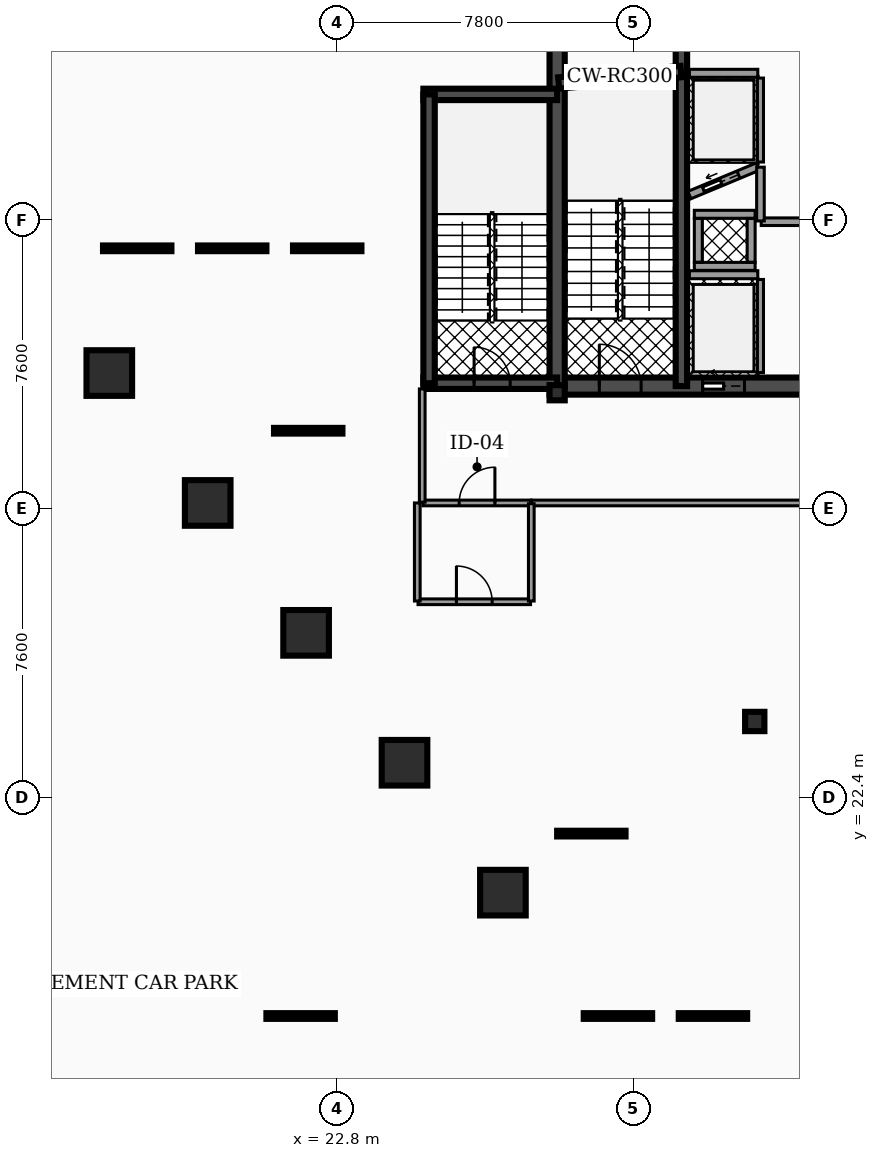
"""IFC4 building model, lengths in metres.
Left out: names, types, materials, properties, quantities, classifications, styles, units other than length and angle.
Written with IfcOpenShell. Run it as: python <this file> out.ifc"""

import sys

from ifc_helpers import new_model, si_unit, direction, frame, frame_2d, origin, origin_2d, place, context, subcontext, project, spatial, rectangle, hollow_rectangle, hollow_circle, extrude, element, fill, save


model = new_model("IFC4")
c1 = context("Model", 3, precision=1e-05, world=origin(), true_north=direction((0.0, 1.0)))
c2 = subcontext(c1, "Body", "Model", "MODEL_VIEW")
j1 = project(units=[si_unit("LENGTHUNIT", "METRE"), si_unit("PLANEANGLEUNIT", "RADIAN")], contexts=[c1])
p1 = place(None, origin())
s1 = spatial("IfcSite", under=j1, at=p1, CompositionType="ELEMENT")
p2 = place(p1, origin())
s2 = spatial("IfcBuilding", under=s1, at=p2, CompositionType="ELEMENT")
p3 = place(p2, frame((0.0, 0.0, -4.08)))
s3 = spatial("IfcBuildingStorey", under=s2, at=p3, CompositionType="ELEMENT", Elevation=-4.08)
p4 = place(p3, frame((28.4, 33.225, 0.0), z_axis=(0.0, 0.0, 1.0), x_axis=(1.0, 0.0, 0.0)))
e1 = element("IfcWall", 1, at=p4, inside=s3, PredefinedType="SHEAR", context=c2, shape_type="SweptSolid", body=[
    extrude(rectangle(XDim=20.11, YDim=0.45, at=frame_2d((10.055, 0.0))), origin(), (0.0, 0.0, 1.0), 3.76),
])
p5 = place(p4, frame((4.03, 0.0, 0.0)))
e2 = element("IfcOpeningElement", 2, at=p5, cuts=e1, PredefinedType="OPENING", context=c2, shape_type="SweptSolid", body=[
    extrude(rectangle(XDim=1.1, YDim=2.15, at=frame_2d((0.55, 1.075))), frame((0.0, 0.235, 0.0), z_axis=(0.0, -1.0, 0.0), x_axis=(1.0, 0.0, 0.0)), (0.0, 0.0, 1.0), 0.47),
])
p6 = place(p4, frame((14.87, 0.0, 0.0)))
e3 = element("IfcOpeningElement", 3, at=p6, cuts=e1, PredefinedType="OPENING", context=c2, shape_type="SweptSolid", body=[
    extrude(rectangle(XDim=1.1, YDim=2.15, at=frame_2d((0.55, 1.075))), frame((0.0, 0.235, 0.0), z_axis=(0.0, -1.0, 0.0), x_axis=(1.0, 0.0, 0.0)), (0.0, 0.0, 1.0), 0.47),
])
p7 = place(p4, frame((1.31, 0.0, 0.0)))
e4 = element("IfcOpeningElement", 4, at=p7, cuts=e1, PredefinedType="OPENING", context=c2, shape_type="SweptSolid", body=[
    extrude(rectangle(XDim=1.1, YDim=2.2, at=frame_2d((0.55, 1.1))), frame((0.0, 0.235, 0.0), z_axis=(0.0, -1.0, 0.0), x_axis=(1.0, 0.0, 0.0)), (0.0, 0.0, 1.0), 0.47),
])
p8 = place(p4, frame((9.44, 0.0, 0.0)))
e5 = element("IfcOpeningElement", 5, at=p8, cuts=e1, PredefinedType="OPENING", context=c2, shape_type="SweptSolid", body=[
    extrude(rectangle(XDim=1.12, YDim=2.05, at=frame_2d((0.56, 1.025))), frame((0.0, 0.235, 0.0), z_axis=(0.0, -1.0, 0.0), x_axis=(1.0, 0.0, 0.0)), (0.0, 0.0, 1.0), 0.47),
])
p9 = place(p4, frame((17.65, 0.0, 0.0)))
e6 = element("IfcOpeningElement", 6, at=p9, cuts=e1, PredefinedType="OPENING", context=c2, shape_type="SweptSolid", body=[
    extrude(rectangle(XDim=1.1, YDim=2.2, at=frame_2d((0.55, 1.1))), frame((0.0, 0.235, 0.0), z_axis=(0.0, -1.0, 0.0), x_axis=(1.0, 0.0, 0.0)), (0.0, 0.0, 1.0), 0.47),
])
p10 = place(p3, frame((28.6, 33.225, 0.0), z_axis=(0.0, 0.0, 1.0), x_axis=(0.0, 1.0, 0.0)))
e7 = element("IfcWall", 7, at=p10, inside=s3, PredefinedType="SHEAR", context=c2, shape_type="SweptSolid", body=[
    extrude(rectangle(XDim=10.25, YDim=0.4, at=frame_2d((5.125, 0.0))), origin(), (0.0, 0.0, 1.0), 3.76),
])
p11 = place(p3, frame((31.87, 33.225, 0.0), z_axis=(0.0, 0.0, 1.0), x_axis=(0.0, 1.0, 0.0)))
e8 = element("IfcWall", 8, at=p11, inside=s3, PredefinedType="SHEAR", context=c2, shape_type="SweptSolid", body=[
    extrude(rectangle(XDim=10.25, YDim=0.3, at=frame_2d((5.125, 0.0))), origin(), (0.0, 0.0, 1.0), 3.76),
])
p12 = place(p3, frame((28.64, 41.2, 0.0), z_axis=(0.0, 0.0, 1.0), x_axis=(0.995687118776, 0.092774789157, 0.0)))
e9 = element("IfcWall", 9, at=p12, inside=s3, PredefinedType="SHEAR", context=c2, shape_type="SweptSolid", body=[
    extrude(rectangle(XDim=3.234, YDim=0.3, at=frame_2d((1.617, 0.0))), origin(), (0.0, 0.0, 1.0), 3.76),
])
p13 = place(p3, frame((25.08, 40.9, 0.0), z_axis=(0.0, 0.0, 1.0), x_axis=(1.0, 0.0, 0.0)))
e10 = element("IfcWall", 10, at=p13, inside=s3, PredefinedType="SHEAR", context=c2, shape_type="SweptSolid", body=[
    extrude(rectangle(XDim=3.52, YDim=0.3, at=frame_2d((1.76, 0.0))), origin(), (0.0, 0.0, 1.0), 3.76),
])
p14 = place(p3, frame((25.08, 33.3, 0.0), z_axis=(0.0, 0.0, 1.0), x_axis=(1.0, 0.0, 0.0)))
e11 = element("IfcWall", 11, at=p14, inside=s3, PredefinedType="SHEAR", context=c2, shape_type="SweptSolid", body=[
    extrude(rectangle(XDim=3.52, YDim=0.3, at=frame_2d((1.76, 0.0))), origin(), (0.0, 0.0, 1.0), 3.76),
])
p15 = place(p14, frame((1.335, 0.0, 0.0)))
e12 = element("IfcOpeningElement", 12, at=p15, cuts=e11, PredefinedType="OPENING", context=c2, shape_type="SweptSolid", body=[
    extrude(rectangle(XDim=0.95, YDim=2.2, at=frame_2d((0.475, 1.1))), frame((0.0, 0.16, 0.0), z_axis=(0.0, -1.0, 0.0), x_axis=(1.0, 0.0, 0.0)), (0.0, 0.0, 1.0), 0.32),
])
p16 = place(p3, frame((25.23, 33.3, 0.0), z_axis=(0.0, 0.0, 1.0), x_axis=(0.0, 1.0, 0.0)))
e13 = element("IfcWall", 13, at=p16, inside=s3, PredefinedType="SHEAR", context=c2, shape_type="SweptSolid", body=[
    extrude(rectangle(XDim=7.6, YDim=0.3, at=frame_2d((3.8, 0.0))), origin(), (0.0, 0.0, 1.0), 3.76),
])
for number, where, z_axis, x_axis in (
    (14, (16.815, 33.568, 0.0), (0.0, 0.0, 1.0), (1.0, 0.0, 0.0)),
    (15, (19.405, 30.15, 0.0), (0.0, 0.0, 1.0), (1.0, 0.0, 0.0)),
    (16, (21.994, 26.732, 0.0), (0.0, 0.0, 1.0), (1.0, 0.0, 0.0)),
    (17, (24.583, 23.314, 0.0), (0.0, 0.0, 1.0), (1.0, 0.0, 0.0)),
    (18, (27.173, 19.896, 0.0), (0.0, 0.0, 1.0), (1.0, 0.0, 0.0)),
):
    element("IfcColumn", number, at=place(p3, frame(where, z_axis=z_axis, x_axis=x_axis)), inside=s3, PredefinedType="COLUMN", context=c2, shape_type="SweptSolid", body=[
        extrude(hollow_rectangle(XDim=1.2, YDim=1.2, WallThickness=0.06, at=origin_2d()), origin(), (0.0, 0.0, 1.0), 3.76),
    ])
p17 = place(p3, frame((28.6, 33.05, 0.0), z_axis=(0.0, 0.0, 1.0), x_axis=(1.0, 0.0, 0.0)))
e19 = element("IfcColumn", 19, at=p17, inside=s3, PredefinedType="PILASTER", context=c2, shape_type="SweptSolid", body=[
    extrude(hollow_rectangle(XDim=0.4, YDim=0.4, WallThickness=0.02, at=origin_2d()), origin(), (0.0, 0.0, 1.0), 3.76),
])
p18 = place(p3, frame((33.8, 24.4, 0.0), z_axis=(0.0, 0.0, 1.0), x_axis=(1.0, 0.0, 0.0)))
e20 = element("IfcColumn", 20, at=p18, inside=s3, PredefinedType="COLUMN", context=c2, shape_type="SweptSolid", body=[
    extrude(hollow_circle(Radius=0.254, WallThickness=0.02, at=origin_2d()), origin(), (0.0, 0.0, 1.0), 3.76),
])
p19 = place(p3, frame((32.08, 36.155, 0.0), z_axis=(0.0, 0.0, 1.0), x_axis=(1.0, 0.0, 0.0)))
e21 = element("IfcWall", 21, at=p19, inside=s3, PredefinedType="SOLIDWALL", context=c2, shape_type="SweptSolid", body=[
    extrude(rectangle(XDim=1.8, YDim=0.21, at=frame_2d((0.9, 0.0))), origin(), (0.0, 0.0, 1.0), 2.732),
])
p20 = place(p3, frame((33.95, 33.58, 0.0), z_axis=(0.0, 0.0, 1.0), x_axis=(0.0, 1.0, 0.0)))
e22 = element("IfcWall", 22, at=p20, inside=s3, PredefinedType="SOLIDWALL", context=c2, shape_type="SweptSolid", body=[
    extrude(rectangle(XDim=2.45, YDim=0.16, at=frame_2d((1.225, 0.0))), origin(), (0.0, 0.0, 1.0), 2.732),
])
p21 = place(p3, frame((32.08, 38.25, 0.0), z_axis=(0.0, 0.0, 1.0), x_axis=(0.923062104416, 0.384650947472, 0.0)))
e23 = element("IfcWall", 23, at=p21, inside=s3, PredefinedType="SOLIDWALL", context=c2, shape_type="SweptSolid", body=[
    extrude(rectangle(XDim=1.95, YDim=0.21, at=frame_2d((0.975, 0.0))), origin(), (0.0, 0.0, 1.0), 2.732),
])
p22 = place(p21, frame((0.4, 0.0, 0.0)))
e24 = element("IfcOpeningElement", 24, at=p22, cuts=e23, PredefinedType="OPENING", context=c2, shape_type="SweptSolid", body=[
    extrude(rectangle(XDim=1.0, YDim=2.1, at=frame_2d((0.5, 1.05))), frame((0.0, 0.115, 0.0), z_axis=(0.0, -1.0, 0.0), x_axis=(1.0, 0.0, 0.0)), (0.0, 0.0, 1.0), 0.23),
])
p23 = place(p3, frame((32.08, 41.455, 0.0), z_axis=(0.0, 0.0, 1.0), x_axis=(1.0, 0.0, 0.0)))
e25 = element("IfcWall", 25, at=p23, inside=s3, PredefinedType="SOLIDWALL", context=c2, shape_type="SweptSolid", body=[
    extrude(rectangle(XDim=1.8, YDim=0.21, at=frame_2d((0.9, 0.0))), origin(), (0.0, 0.0, 1.0), 2.732),
])
p24 = place(p3, frame((33.95, 39.12, 0.0), z_axis=(0.0, 0.0, 1.0), x_axis=(0.0, 1.0, 0.0)))
e26 = element("IfcWall", 26, at=p24, inside=s3, PredefinedType="SOLIDWALL", context=c2, shape_type="SweptSolid", body=[
    extrude(rectangle(XDim=2.21, YDim=0.16, at=frame_2d((1.105, 0.0))), origin(), (0.0, 0.0, 1.0), 2.732),
])
for number, where, z_axis, x_axis in (
    (27, (32.21, 36.375, 0.0), (0.0, 0.0, 1.0), (1.0, 0.0, 0.0)),
    (28, (32.21, 37.745, 0.0), (0.0, 0.0, 1.0), (1.0, 0.0, 0.0)),
):
    element("IfcWall", number, at=place(p3, frame(where, z_axis=z_axis, x_axis=x_axis)), inside=s3, PredefinedType="SOLIDWALL", context=c2, shape_type="SweptSolid", body=[
        extrude(rectangle(XDim=1.6, YDim=0.21, at=frame_2d((0.8, 0.0))), origin(), (0.0, 0.0, 1.0), 3.76),
    ])
for number, where, z_axis, x_axis in (
    (29, (32.315, 36.485, 0.0), (0.0, 0.0, 1.0), (0.0, 1.0, 0.0)),
    (30, (33.705, 36.485, 0.0), (0.0, 0.0, 1.0), (0.0, 1.0, 0.0)),
):
    element("IfcWall", number, at=place(p3, frame(where, z_axis=z_axis, x_axis=x_axis)), inside=s3, PredefinedType="SOLIDWALL", context=c2, shape_type="SweptSolid", body=[
        extrude(rectangle(XDim=1.15, YDim=0.21, at=frame_2d((0.575, 0.0))), origin(), (0.0, 0.0, 1.0), 3.76),
    ])
p25 = place(p3, frame((33.97, 37.55, 0.0), z_axis=(0.0, 0.0, 1.0), x_axis=(1.0, 0.0, 0.0)))
e31 = element("IfcWall", 31, at=p25, inside=s3, PredefinedType="PARTITIONING", context=c2, shape_type="SweptSolid", body=[
    extrude(rectangle(XDim=3.56, YDim=0.2, at=frame_2d((1.78, 0.0))), origin(), (0.0, 0.0, 1.0), 2.717),
])
p26 = place(p3, frame((33.95, 37.57, 0.0), z_axis=(0.0, 0.0, 1.0), x_axis=(0.0, 1.0, 0.0)))
e32 = element("IfcWall", 32, at=p26, inside=s3, PredefinedType="PARTITIONING", context=c2, shape_type="SweptSolid", body=[
    extrude(rectangle(XDim=1.415, YDim=0.2, at=frame_2d((0.708, 0.0))), origin(), (0.0, 0.0, 1.0), 2.717),
])
p27 = place(p3, frame((25.07, 30.15, 0.0), z_axis=(0.0, 0.0, 1.0), x_axis=(1.0, 0.0, 0.0)))
e33 = element("IfcWall", 33, at=p27, inside=s3, PredefinedType="PARTITIONING", context=c2, shape_type="SweptSolid", body=[
    extrude(rectangle(XDim=2.845, YDim=0.15, at=frame_2d((1.422, 0.0))), origin(), (0.0, 0.0, 1.0), 2.717),
])
p28 = place(p27, frame((0.952, 0.0, 0.0)))
e34 = element("IfcOpeningElement", 34, at=p28, cuts=e33, PredefinedType="OPENING", context=c2, shape_type="SweptSolid", body=[
    extrude(rectangle(XDim=0.94, YDim=2.05, at=frame_2d((0.47, 1.025))), frame((0.0, 0.085, 0.0), z_axis=(0.0, -1.0, 0.0), x_axis=(1.0, 0.0, 0.0)), (0.0, 0.0, 1.0), 0.17),
])
p29 = place(p3, frame((27.925, 30.15, 0.0), z_axis=(0.0, 0.0, 1.0), x_axis=(1.0, 0.0, 0.0)))
e35 = element("IfcWall", 35, at=p29, inside=s3, PredefinedType="PARTITIONING", context=c2, shape_type="SweptSolid", body=[
    extrude(rectangle(XDim=17.47, YDim=0.15, at=frame_2d((8.735, 0.0))), origin(), (0.0, 0.0, 1.0), 2.717),
])
p30 = place(p29, frame((8.265, 0.0, 0.0)))
e36 = element("IfcOpeningElement", 36, at=p30, cuts=e35, PredefinedType="OPENING", context=c2, shape_type="SweptSolid", body=[
    extrude(rectangle(XDim=0.94, YDim=2.05, at=frame_2d((0.47, 1.025))), frame((0.0, 0.085, 0.0), z_axis=(0.0, -1.0, 0.0), x_axis=(1.0, 0.0, 0.0)), (0.0, 0.0, 1.0), 0.17),
])
p31 = place(p3, frame((25.05, 30.17, 0.0), z_axis=(0.0, 0.0, 1.0), x_axis=(0.0, 1.0, 0.0)))
e37 = element("IfcWall", 37, at=p31, inside=s3, PredefinedType="PARTITIONING", context=c2, shape_type="SweptSolid", body=[
    extrude(rectangle(XDim=2.98, YDim=0.15, at=frame_2d((1.49, 0.0))), origin(), (0.0, 0.0, 1.0), 2.717),
])
p32 = place(p3, frame((24.94, 27.55, 0.0), z_axis=(0.0, 0.0, 1.0), x_axis=(1.0, 0.0, 0.0)))
e38 = element("IfcWall", 38, at=p32, inside=s3, PredefinedType="PARTITIONING", context=c2, shape_type="SweptSolid", body=[
    extrude(rectangle(XDim=2.96, YDim=0.15, at=frame_2d((1.48, 0.0))), origin(), (0.0, 0.0, 1.0), 2.717),
])
p33 = place(p32, frame((1.01, 0.0, 0.0)))
e39 = element("IfcOpeningElement", 39, at=p33, cuts=e38, PredefinedType="OPENING", context=c2, shape_type="SweptSolid", body=[
    extrude(rectangle(XDim=0.94, YDim=2.05, at=frame_2d((0.47, 1.025))), frame((0.0, 0.085, 0.0), z_axis=(0.0, -1.0, 0.0), x_axis=(1.0, 0.0, 0.0)), (0.0, 0.0, 1.0), 0.17),
])
p34 = place(p3, frame((24.92, 27.57, 0.0), z_axis=(0.0, 0.0, 1.0), x_axis=(0.0, 1.0, 0.0)))
e40 = element("IfcWall", 40, at=p34, inside=s3, PredefinedType="PARTITIONING", context=c2, shape_type="SweptSolid", body=[
    extrude(rectangle(XDim=2.58, YDim=0.15, at=frame_2d((1.29, 0.0))), origin(), (0.0, 0.0, 1.0), 2.717),
])
p35 = place(p3, frame((27.92, 27.57, 0.0), z_axis=(0.0, 0.0, 1.0), x_axis=(0.0, 1.0, 0.0)))
e41 = element("IfcWall", 41, at=p35, inside=s3, PredefinedType="PARTITIONING", context=c2, shape_type="SweptSolid", body=[
    extrude(rectangle(XDim=2.56, YDim=0.15, at=frame_2d((1.28, 0.0))), origin(), (0.0, 0.0, 1.0), 2.717),
])
p36 = place(p5, origin())
e42 = element("IfcDoor", 42, at=p36, inside=s3, OperationType="SLIDING_TO_LEFT", PredefinedType="DOOR", context=c2, shape_type="SweptSolid", body=[
    extrude(rectangle(XDim=1.1, YDim=2.15, at=frame_2d((0.55, 1.075))), frame((0.0, 0.025, 0.0), z_axis=(0.0, -1.0, 0.0), x_axis=(1.0, 0.0, 0.0)), (0.0, 0.0, 1.0), 0.05),
])
fill(e2, e42)
p37 = place(p22, origin())
e43 = element("IfcDoor", 43, at=p37, inside=s3, OperationType="SLIDING_TO_LEFT", PredefinedType="DOOR", context=c2, shape_type="SweptSolid", body=[
    extrude(rectangle(XDim=1.0, YDim=2.1, at=frame_2d((0.5, 1.05))), frame((0.0, 0.025, 0.0), z_axis=(0.0, -1.0, 0.0), x_axis=(1.0, 0.0, 0.0)), (0.0, 0.0, 1.0), 0.05),
])
fill(e24, e43)
p38 = place(p7, origin())
e44 = element("IfcDoor", 44, at=p38, inside=s3, OperationType="SINGLE_SWING_LEFT", PredefinedType="DOOR", context=c2, shape_type="SweptSolid", body=[
    extrude(rectangle(XDim=1.1, YDim=2.2, at=frame_2d((0.55, 1.1))), frame((0.0, 0.025, 0.0), z_axis=(0.0, -1.0, 0.0), x_axis=(1.0, 0.0, 0.0)), (0.0, 0.0, 1.0), 0.05),
])
fill(e4, e44)
p39 = place(p15, origin())
e45 = element("IfcDoor", 45, at=p39, inside=s3, OperationType="SINGLE_SWING_LEFT", PredefinedType="DOOR", context=c2, shape_type="SweptSolid", body=[
    extrude(rectangle(XDim=0.95, YDim=2.2, at=frame_2d((0.475, 1.1))), frame((0.0, 0.025, 0.0), z_axis=(0.0, -1.0, 0.0), x_axis=(1.0, 0.0, 0.0)), (0.0, 0.0, 1.0), 0.05),
])
fill(e12, e45)
p40 = place(p28, origin())
e46 = element("IfcDoor", 46, at=p40, inside=s3, OperationType="SINGLE_SWING_RIGHT", PredefinedType="DOOR", context=c2, shape_type="SweptSolid", body=[
    extrude(rectangle(XDim=0.94, YDim=2.05, at=frame_2d((0.47, 1.025))), frame((0.0, 0.025, 0.0), z_axis=(0.0, -1.0, 0.0), x_axis=(1.0, 0.0, 0.0)), (0.0, 0.0, 1.0), 0.05),
])
fill(e34, e46)
p41 = place(p33, origin())
e47 = element("IfcDoor", 47, at=p41, inside=s3, OperationType="SINGLE_SWING_LEFT", PredefinedType="DOOR", context=c2, shape_type="SweptSolid", body=[
    extrude(rectangle(XDim=0.94, YDim=2.05, at=frame_2d((0.47, 1.025))), frame((0.0, 0.025, 0.0), z_axis=(0.0, -1.0, 0.0), x_axis=(1.0, 0.0, 0.0)), (0.0, 0.0, 1.0), 0.05),
])
fill(e39, e47)
save(model, sys.argv[1])
